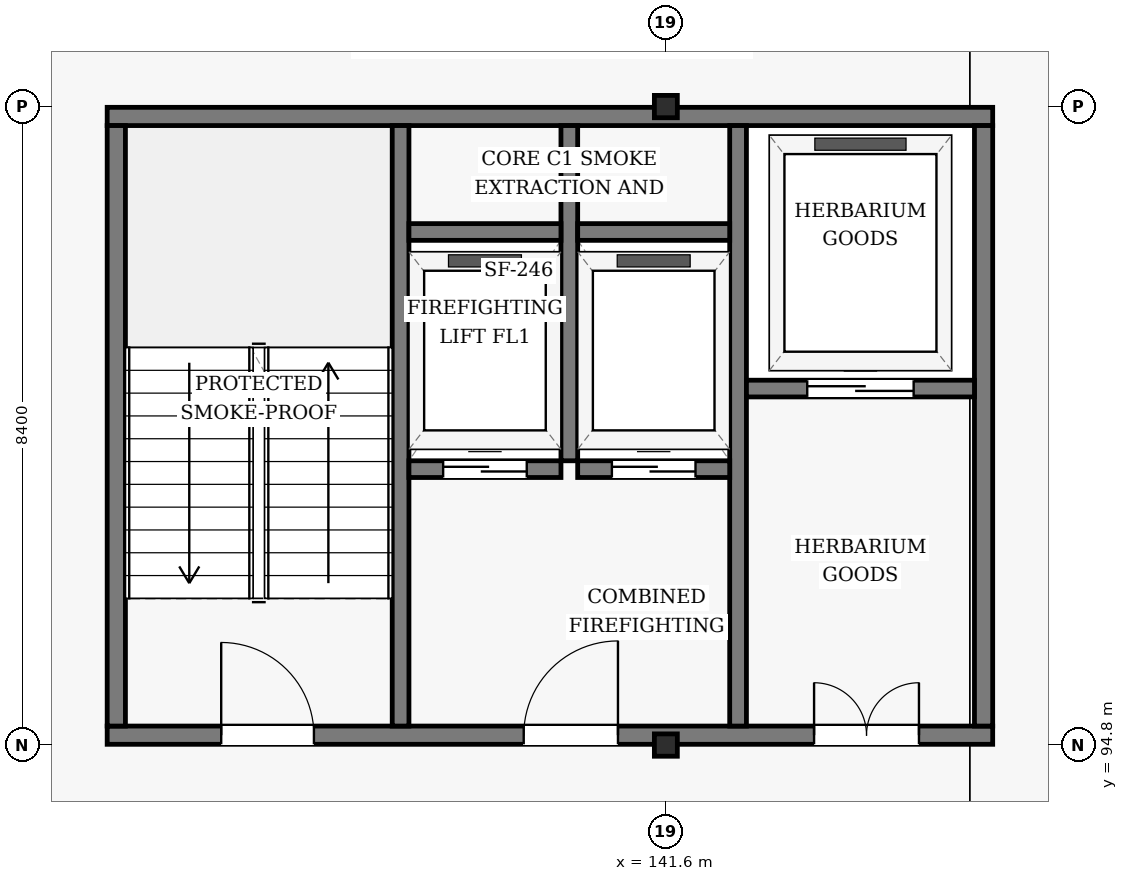
"""IFC4 building model, lengths in metres.
Left out: names, types, materials, properties, quantities, classifications, styles, units other than length and angle.
Written with IfcOpenShell. Run it as: python <this file> out.ifc"""

import sys

from ifc_helpers import new_model, si_unit, direction, frame, frame_2d, origin, origin_2d, place, context, subcontext, project, spatial, rectangle, i_section, extrude, element, fill, save


model = new_model("IFC4")
c1 = context("Model", 3, precision=1e-05, world=origin(), true_north=direction((0.0, 1.0)))
c2 = subcontext(c1, "Body", "Model", "MODEL_VIEW")
j1 = project(units=[si_unit("LENGTHUNIT", "METRE"), si_unit("PLANEANGLEUNIT", "RADIAN")], contexts=[c1])
p1 = place(None, origin())
s1 = spatial("IfcSite", under=j1, at=p1, CompositionType="ELEMENT")
p2 = place(p1, origin())
s2 = spatial("IfcBuilding", under=s1, at=p2, CompositionType="ELEMENT")
p3 = place(p2, frame((0.0, 0.0, 46.8)))
s3 = spatial("IfcBuildingStorey", under=s2, at=p3, CompositionType="ELEMENT", Elevation=46.8)
for number, where, z_axis, x_axis in (
    (1, (141.6, 94.8, 0.0), (0.0, 0.0, 1.0), (1.0, 0.0, 0.0)),
    (2, (141.6, 103.2, 0.0), (0.0, 0.0, 1.0), (1.0, 0.0, 0.0)),
):
    element("IfcColumn", number, at=place(p3, frame(where, z_axis=z_axis, x_axis=x_axis)), inside=s3, PredefinedType="COLUMN", context=c2, shape_type="SweptSolid", body=[
        extrude(i_section(OverallWidth=0.302, OverallDepth=0.294, WebThickness=0.012, FlangeThickness=0.012, FilletRadius=0.018, at=origin_2d()), origin(), (0.0, 0.0, 1.0), 3.6),
    ])
p4 = place(p3, frame((134.25, 94.93, 0.0), z_axis=(0.0, 0.0, 1.0), x_axis=(1.0, 0.0, 0.0)))
e3 = element("IfcWall", 3, at=p4, inside=s3, PredefinedType="SHEAR", context=c2, shape_type="SweptSolid", body=[
    extrude(rectangle(XDim=11.65, YDim=0.24, at=frame_2d((5.825, 0.0))), origin(), (0.0, 0.0, 1.0), 3.338),
])
p5 = place(p4, frame((1.5, 0.0, 0.0)))
e4 = element("IfcOpeningElement", 4, at=p5, cuts=e3, PredefinedType="OPENING", context=c2, shape_type="SweptSolid", body=[
    extrude(rectangle(XDim=1.22, YDim=2.18, at=frame_2d((0.61, 1.09))), frame((0.0, 0.13, 0.0), z_axis=(0.0, -1.0, 0.0), x_axis=(1.0, 0.0, 0.0)), (0.0, 0.0, 1.0), 0.26),
])
p6 = place(p4, frame((5.48, 0.0, 0.0)))
e5 = element("IfcOpeningElement", 5, at=p6, cuts=e3, PredefinedType="OPENING", context=c2, shape_type="SweptSolid", body=[
    extrude(rectangle(XDim=1.24, YDim=2.15, at=frame_2d((0.62, 1.075))), frame((0.0, 0.13, 0.0), z_axis=(0.0, -1.0, 0.0), x_axis=(1.0, 0.0, 0.0)), (0.0, 0.0, 1.0), 0.26),
])
p7 = place(p4, frame((9.3, 0.0, 0.0)))
e6 = element("IfcOpeningElement", 6, at=p7, cuts=e3, PredefinedType="OPENING", context=c2, shape_type="SweptSolid", body=[
    extrude(rectangle(XDim=1.38, YDim=2.15, at=frame_2d((0.69, 1.075))), frame((0.0, 0.13, 0.0), z_axis=(0.0, -1.0, 0.0), x_axis=(1.0, 0.0, 0.0)), (0.0, 0.0, 1.0), 0.26),
])
p8 = place(p3, frame((134.25, 103.07, 0.0), z_axis=(0.0, 0.0, 1.0), x_axis=(1.0, 0.0, 0.0)))
e7 = element("IfcWall", 7, at=p8, inside=s3, PredefinedType="SHEAR", context=c2, shape_type="SweptSolid", body=[
    extrude(rectangle(XDim=11.65, YDim=0.24, at=frame_2d((5.825, 0.0))), origin(), (0.0, 0.0, 1.0), 3.338),
])
p9 = place(p3, frame((134.37, 95.05, 0.0), z_axis=(0.0, 0.0, 1.0), x_axis=(0.0, 1.0, 0.0)))
e8 = element("IfcWall", 8, at=p9, inside=s3, PredefinedType="SHEAR", context=c2, shape_type="SweptSolid", body=[
    extrude(rectangle(XDim=7.9, YDim=0.24, at=frame_2d((3.95, 0.0))), origin(), (0.0, 0.0, 1.0), 3.338),
])
p10 = place(p3, frame((138.11, 95.05, 0.0), z_axis=(0.0, 0.0, 1.0), x_axis=(0.0, 1.0, 0.0)))
e9 = element("IfcWall", 9, at=p10, inside=s3, PredefinedType="SHEAR", context=c2, shape_type="SweptSolid", body=[
    extrude(rectangle(XDim=7.9, YDim=0.22, at=frame_2d((3.95, 0.0))), origin(), (0.0, 0.0, 1.0), 3.338),
])
p11 = place(p3, frame((140.33, 98.54, 0.0), z_axis=(0.0, 0.0, 1.0), x_axis=(0.0, 1.0, 0.0)))
e10 = element("IfcWall", 10, at=p11, inside=s3, PredefinedType="SHEAR", context=c2, shape_type="SweptSolid", body=[
    extrude(rectangle(XDim=4.41, YDim=0.22, at=frame_2d((2.205, 0.0))), origin(), (0.0, 0.0, 1.0), 3.338),
])
p12 = place(p3, frame((142.55, 95.05, 0.0), z_axis=(0.0, 0.0, 1.0), x_axis=(0.0, 1.0, 0.0)))
e11 = element("IfcWall", 11, at=p12, inside=s3, PredefinedType="SHEAR", context=c2, shape_type="SweptSolid", body=[
    extrude(rectangle(XDim=7.9, YDim=0.22, at=frame_2d((3.95, 0.0))), origin(), (0.0, 0.0, 1.0), 3.338),
])
p13 = place(p3, frame((145.78, 95.05, 0.0), z_axis=(0.0, 0.0, 1.0), x_axis=(0.0, 1.0, 0.0)))
e12 = element("IfcWall", 12, at=p13, inside=s3, PredefinedType="SHEAR", context=c2, shape_type="SweptSolid", body=[
    extrude(rectangle(XDim=7.9, YDim=0.24, at=frame_2d((3.95, 0.0))), origin(), (0.0, 0.0, 1.0), 3.338),
])
p14 = place(p3, frame((138.22, 98.43, 0.0), z_axis=(0.0, 0.0, 1.0), x_axis=(1.0, 0.0, 0.0)))
e13 = element("IfcWall", 13, at=p14, inside=s3, PredefinedType="SHEAR", context=c2, shape_type="SweptSolid", body=[
    extrude(rectangle(XDim=2.0, YDim=0.22, at=frame_2d((1.0, 0.0))), origin(), (0.0, 0.0, 1.0), 3.338),
])
p15 = place(p14, frame((0.45, 0.0, 0.0)))
e14 = element("IfcOpeningElement", 14, at=p15, cuts=e13, PredefinedType="OPENING", context=c2, shape_type="SweptSolid", body=[
    extrude(rectangle(XDim=1.1, YDim=2.15, at=frame_2d((0.55, 1.075))), frame((0.0, 0.12, 0.0), z_axis=(0.0, -1.0, 0.0), x_axis=(1.0, 0.0, 0.0)), (0.0, 0.0, 1.0), 0.24),
])
p16 = place(p3, frame((140.44, 98.43, 0.0), z_axis=(0.0, 0.0, 1.0), x_axis=(1.0, 0.0, 0.0)))
e15 = element("IfcWall", 15, at=p16, inside=s3, PredefinedType="SHEAR", context=c2, shape_type="SweptSolid", body=[
    extrude(rectangle(XDim=2.0, YDim=0.22, at=frame_2d((1.0, 0.0))), origin(), (0.0, 0.0, 1.0), 3.338),
])
p17 = place(p16, frame((0.45, 0.0, 0.0)))
e16 = element("IfcOpeningElement", 16, at=p17, cuts=e15, PredefinedType="OPENING", context=c2, shape_type="SweptSolid", body=[
    extrude(rectangle(XDim=1.1, YDim=2.15, at=frame_2d((0.55, 1.075))), frame((0.0, 0.12, 0.0), z_axis=(0.0, -1.0, 0.0), x_axis=(1.0, 0.0, 0.0)), (0.0, 0.0, 1.0), 0.24),
])
for number, where, z_axis, x_axis in (
    (17, (138.22, 101.55, 0.0), (0.0, 0.0, 1.0), (1.0, 0.0, 0.0)),
    (18, (140.44, 101.55, 0.0), (0.0, 0.0, 1.0), (1.0, 0.0, 0.0)),
):
    element("IfcWall", number, at=place(p3, frame(where, z_axis=z_axis, x_axis=x_axis)), inside=s3, PredefinedType="SHEAR", context=c2, shape_type="SweptSolid", body=[
        extrude(rectangle(XDim=2.0, YDim=0.22, at=frame_2d((1.0, 0.0))), origin(), (0.0, 0.0, 1.0), 3.338),
    ])
p18 = place(p3, frame((142.66, 99.49, 0.0), z_axis=(0.0, 0.0, 1.0), x_axis=(1.0, 0.0, 0.0)))
e19 = element("IfcWall", 19, at=p18, inside=s3, PredefinedType="SHEAR", context=c2, shape_type="SweptSolid", body=[
    extrude(rectangle(XDim=3.0, YDim=0.22, at=frame_2d((1.5, 0.0))), origin(), (0.0, 0.0, 1.0), 3.338),
])
p19 = place(p18, frame((0.8, 0.0, 0.0)))
e20 = element("IfcOpeningElement", 20, at=p19, cuts=e19, PredefinedType="OPENING", context=c2, shape_type="SweptSolid", body=[
    extrude(rectangle(XDim=1.4, YDim=2.2, at=frame_2d((0.7, 1.1))), frame((0.0, 0.12, 0.0), z_axis=(0.0, -1.0, 0.0), x_axis=(1.0, 0.0, 0.0)), (0.0, 0.0, 1.0), 0.24),
])
p20 = place(p5, origin())
e21 = element("IfcDoor", 21, at=p20, inside=s3, OperationType="SINGLE_SWING_LEFT", PredefinedType="DOOR", context=c2, shape_type="SweptSolid", body=[
    extrude(rectangle(XDim=1.22, YDim=2.18, at=frame_2d((0.61, 1.09))), frame((0.0, 0.025, 0.0), z_axis=(0.0, -1.0, 0.0), x_axis=(1.0, 0.0, 0.0)), (0.0, 0.0, 1.0), 0.05),
])
fill(e4, e21)
p21 = place(p6, frame((1.24, 0.0, 0.0), z_axis=(0.0, 0.0, 1.0), x_axis=(-1.0, 0.0, 0.0)))
e22 = element("IfcDoor", 22, at=p21, inside=s3, OperationType="SINGLE_SWING_RIGHT", PredefinedType="DOOR", context=c2, shape_type="SweptSolid", body=[
    extrude(rectangle(XDim=1.24, YDim=2.15, at=frame_2d((0.62, 1.075))), frame((0.0, 0.025, 0.0), z_axis=(0.0, -1.0, 0.0), x_axis=(1.0, 0.0, 0.0)), (0.0, 0.0, 1.0), 0.05),
])
fill(e5, e22)
p22 = place(p7, frame((1.38, 0.0, 0.0), z_axis=(0.0, 0.0, 1.0), x_axis=(-1.0, 0.0, 0.0)))
e23 = element("IfcDoor", 23, at=p22, inside=s3, OperationType="DOUBLE_DOOR_SINGLE_SWING", PredefinedType="DOOR", context=c2, shape_type="SweptSolid", body=[
    extrude(rectangle(XDim=1.38, YDim=2.15, at=frame_2d((0.69, 1.075))), frame((0.0, 0.025, 0.0), z_axis=(0.0, -1.0, 0.0), x_axis=(1.0, 0.0, 0.0)), (0.0, 0.0, 1.0), 0.05),
])
fill(e6, e23)
p23 = place(p15, origin())
e24 = element("IfcDoor", 24, at=p23, inside=s3, OperationType="SLIDING_TO_LEFT", PredefinedType="DOOR", context=c2, shape_type="SweptSolid", body=[
    extrude(rectangle(XDim=1.1, YDim=2.15, at=frame_2d((0.55, 1.075))), frame((0.0, 0.025, 0.0), z_axis=(0.0, -1.0, 0.0), x_axis=(1.0, 0.0, 0.0)), (0.0, 0.0, 1.0), 0.05),
])
fill(e14, e24)
p24 = place(p17, origin())
e25 = element("IfcDoor", 25, at=p24, inside=s3, OperationType="SLIDING_TO_LEFT", PredefinedType="DOOR", context=c2, shape_type="SweptSolid", body=[
    extrude(rectangle(XDim=1.1, YDim=2.15, at=frame_2d((0.55, 1.075))), frame((0.0, 0.025, 0.0), z_axis=(0.0, -1.0, 0.0), x_axis=(1.0, 0.0, 0.0)), (0.0, 0.0, 1.0), 0.05),
])
fill(e16, e25)
p25 = place(p19, origin())
e26 = element("IfcDoor", 26, at=p25, inside=s3, OperationType="SLIDING_TO_LEFT", PredefinedType="DOOR", context=c2, shape_type="SweptSolid", body=[
    extrude(rectangle(XDim=1.4, YDim=2.2, at=frame_2d((0.7, 1.1))), frame((0.0, 0.025, 0.0), z_axis=(0.0, -1.0, 0.0), x_axis=(1.0, 0.0, 0.0)), (0.0, 0.0, 1.0), 0.05),
])
fill(e20, e26)
save(model, sys.argv[1])
